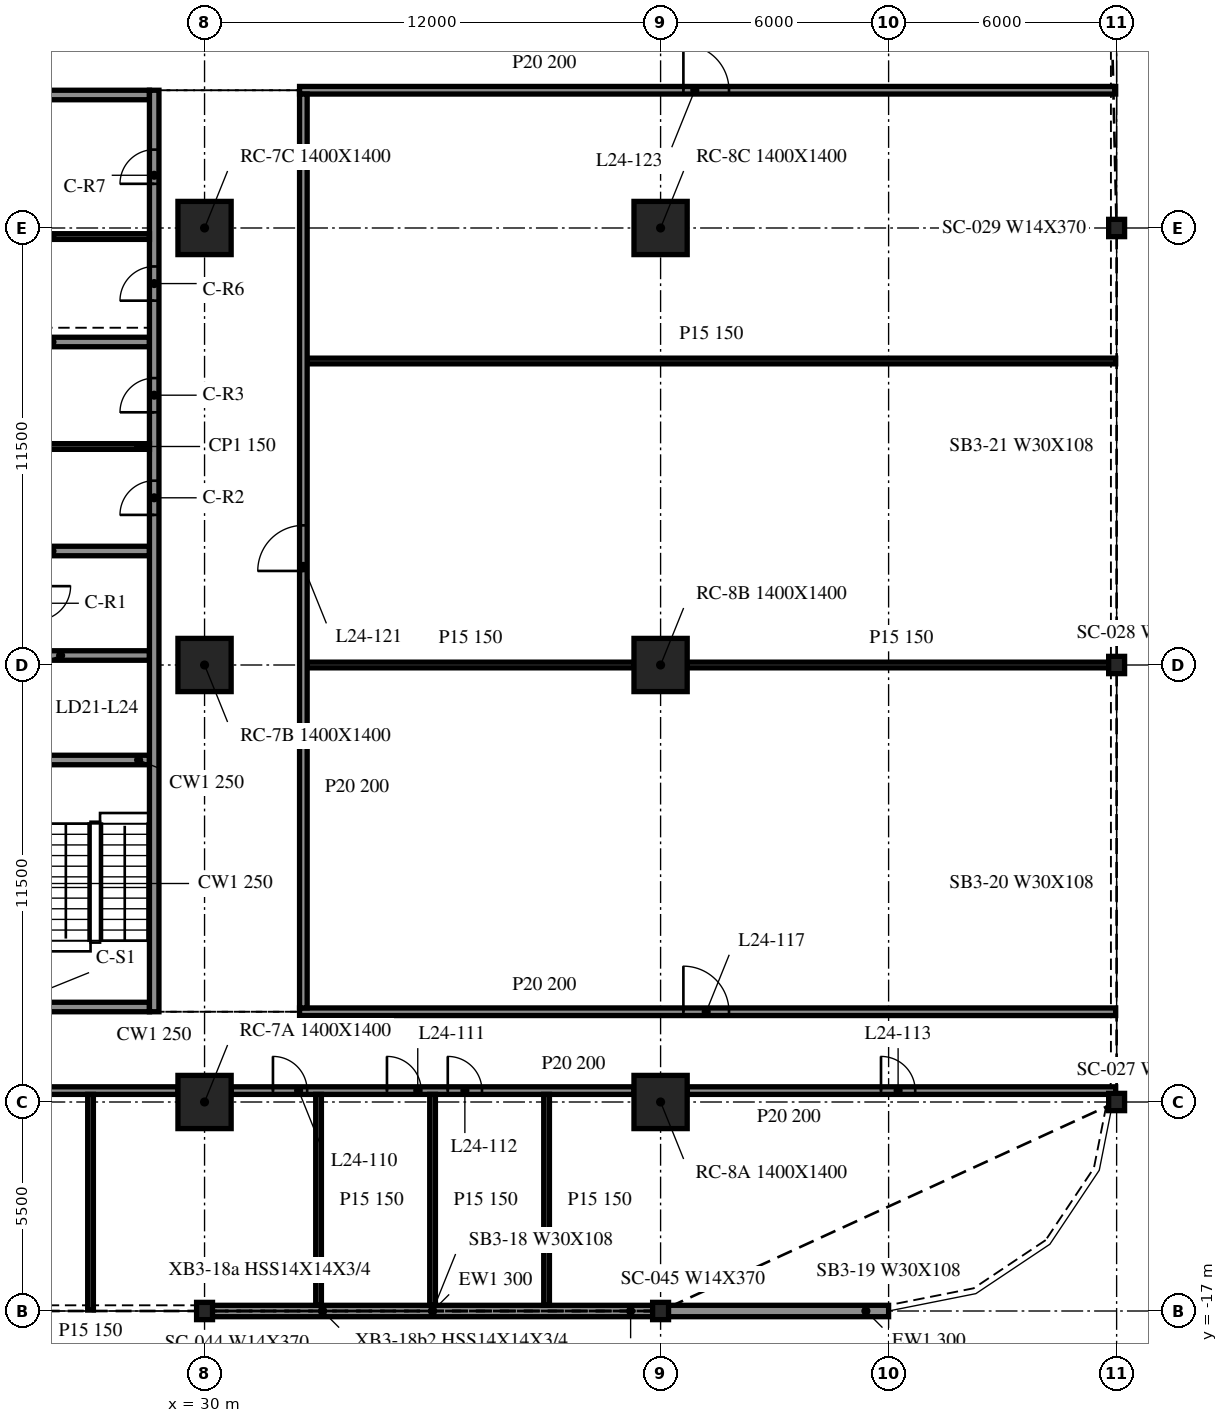
"""IFC4 building model, lengths in metres.
Left out: names, types, materials, properties, quantities, classifications, styles, units other than length and angle.
Written with IfcOpenShell. Run it as: python <this file> out.ifc"""

import sys

from ifc_helpers import new_model, si_unit, direction, frame, frame_2d, origin, origin_2d, place, context, subcontext, project, spatial, rectangle, i_section, extrude, element, fill, save


model = new_model("IFC4")
c1 = context("Model", 3, precision=1e-05, world=origin(), true_north=direction((0.0, 1.0)))
c2 = subcontext(c1, "Body", "Model", "MODEL_VIEW")
j1 = project(units=[si_unit("LENGTHUNIT", "METRE"), si_unit("PLANEANGLEUNIT", "RADIAN")], contexts=[c1])
p1 = place(None, origin())
s1 = spatial("IfcSite", under=j1, at=p1, CompositionType="ELEMENT")
p2 = place(p1, origin())
s2 = spatial("IfcBuilding", under=s1, at=p2, CompositionType="ELEMENT")
p3 = place(p2, frame((0.0, 0.0, 105.3)))
s3 = spatial("IfcBuildingStorey", under=s2, at=p3, CompositionType="ELEMENT", Elevation=105.3)
for number, where, z_axis, x_axis in (
    (1, (30.0, -11.5, -0.34), (0.0, 0.0, 1.0), (1.0, 0.0, 0.0)),
    (2, (30.0, 0.0, -0.34), (0.0, 0.0, 1.0), (1.0, 0.0, 0.0)),
    (3, (30.0, 11.5, -0.34), (0.0, 0.0, 1.0), (1.0, 0.0, 0.0)),
    (4, (42.0, -11.5, -0.34), (0.0, 0.0, 1.0), (1.0, 0.0, 0.0)),
    (5, (42.0, 0.0, -0.34), (0.0, 0.0, 1.0), (1.0, 0.0, 0.0)),
    (6, (42.0, 11.5, -0.34), (0.0, 0.0, 1.0), (1.0, 0.0, 0.0)),
):
    element("IfcColumn", number, at=place(p3, frame(where, z_axis=z_axis, x_axis=x_axis)), inside=s3, PredefinedType="COLUMN", context=c2, shape_type="SweptSolid", body=[
        extrude(rectangle(XDim=1.4, YDim=1.4, at=origin_2d()), origin(), (0.0, 0.0, 1.0), 4.1),
    ])
for number, where, z_axis, x_axis in (
    (7, (30.0, -17.0, -0.34), (0.0, 0.0, 1.0), (1.0, 0.0, 0.0)),
    (8, (42.0, -17.0, -0.34), (0.0, 0.0, 1.0), (1.0, 0.0, 0.0)),
    (9, (54.0, -11.5, -0.34), (0.0, 0.0, 1.0), (1.0, 0.0, 0.0)),
    (10, (54.0, 0.0, -0.34), (0.0, 0.0, 1.0), (1.0, 0.0, 0.0)),
    (11, (54.0, 11.5, -0.34), (0.0, 0.0, 1.0), (1.0, 0.0, 0.0)),
):
    element("IfcColumn", number, at=place(p3, frame(where, z_axis=z_axis, x_axis=x_axis)), inside=s3, PredefinedType="COLUMN", context=c2, shape_type="SweptSolid", body=[
        extrude(i_section(OverallWidth=0.419, OverallDepth=0.455, WebThickness=0.042, FlangeThickness=0.068, at=origin_2d()), origin(), (0.0, 0.0, 1.0), 4.1),
    ])
p4 = place(p3, frame((30.021, -17.0, 0.0), z_axis=(0.0, 0.0, 1.0), x_axis=(1.0, 0.0, 0.0)))
e12 = element("IfcWall", 12, at=p4, inside=s3, PredefinedType="NOTDEFINED", context=c2, shape_type="SweptSolid", body=[
    extrude(rectangle(XDim=11.958, YDim=0.3, at=frame_2d((5.979, 0.0))), origin(), (0.0, 0.0, 1.0), 3.003),
])
p5 = place(p3, frame((42.021, -17.0, 0.0), z_axis=(0.0, 0.0, 1.0), x_axis=(1.0, 0.0, 0.0)))
e13 = element("IfcWall", 13, at=p5, inside=s3, PredefinedType="NOTDEFINED", context=c2, shape_type="SweptSolid", body=[
    extrude(rectangle(XDim=5.979, YDim=0.3, at=frame_2d((2.99, 0.0))), origin(), (0.0, 0.0, 1.0), 3.003),
])
p6 = place(p3, frame((28.675, -9.125, 0.0), z_axis=(0.0, 0.0, 1.0), x_axis=(0.0, 1.0, 0.0)))
e14 = element("IfcWall", 14, at=p6, inside=s3, PredefinedType="SOLIDWALL", context=c2, shape_type="SweptSolid", body=[
    extrude(rectangle(XDim=24.25, YDim=0.25, at=frame_2d((12.125, 0.0))), origin(), (0.0, 0.0, 1.0), 3.76),
])
p7 = place(p6, frame((13.075, 0.0, 0.0)))
e15 = element("IfcOpeningElement", 15, at=p7, cuts=e14, PredefinedType="OPENING", context=c2, shape_type="SweptSolid", body=[
    extrude(rectangle(XDim=0.9, YDim=2.1, at=frame_2d((0.45, 1.05))), frame((0.0, 0.135, 0.0), z_axis=(0.0, -1.0, 0.0), x_axis=(1.0, 0.0, 0.0)), (0.0, 0.0, 1.0), 0.27),
])
p8 = place(p6, frame((15.775, 0.0, 0.0)))
e16 = element("IfcOpeningElement", 16, at=p8, cuts=e14, PredefinedType="OPENING", context=c2, shape_type="SweptSolid", body=[
    extrude(rectangle(XDim=0.9, YDim=2.1, at=frame_2d((0.45, 1.05))), frame((0.0, 0.135, 0.0), z_axis=(0.0, -1.0, 0.0), x_axis=(1.0, 0.0, 0.0)), (0.0, 0.0, 1.0), 0.27),
])
p9 = place(p6, frame((18.712, 0.0, 0.0)))
e17 = element("IfcOpeningElement", 17, at=p9, cuts=e14, PredefinedType="OPENING", context=c2, shape_type="SweptSolid", body=[
    extrude(rectangle(XDim=0.9, YDim=2.1, at=frame_2d((0.45, 1.05))), frame((0.0, 0.135, 0.0), z_axis=(0.0, -1.0, 0.0), x_axis=(1.0, 0.0, 0.0)), (0.0, 0.0, 1.0), 0.27),
])
p10 = place(p6, frame((21.788, 0.0, 0.0)))
e18 = element("IfcOpeningElement", 18, at=p10, cuts=e14, PredefinedType="OPENING", context=c2, shape_type="SweptSolid", body=[
    extrude(rectangle(XDim=0.9, YDim=2.1, at=frame_2d((0.45, 1.05))), frame((0.0, 0.135, 0.0), z_axis=(0.0, -1.0, 0.0), x_axis=(1.0, 0.0, 0.0)), (0.0, 0.0, 1.0), 0.27),
])
p11 = place(p3, frame((28.55, -9.0, 0.0), z_axis=(0.0, 0.0, 1.0), x_axis=(-1.0, 0.0, 0.0)))
e19 = element("IfcWall", 19, at=p11, inside=s3, PredefinedType="SOLIDWALL", context=c2, shape_type="SweptSolid", body=[
    extrude(rectangle(XDim=9.1, YDim=0.25, at=frame_2d((4.55, 0.0))), origin(), (0.0, 0.0, 1.0), 3.76),
])
p12 = place(p11, frame((3.65, 0.0, 0.0)))
e20 = element("IfcOpeningElement", 20, at=p12, cuts=e19, PredefinedType="OPENING", context=c2, shape_type="SweptSolid", body=[
    extrude(rectangle(XDim=1.8, YDim=2.1, at=frame_2d((0.9, 1.05))), frame((0.0, 0.135, 0.0), z_axis=(0.0, -1.0, 0.0), x_axis=(1.0, 0.0, 0.0)), (0.0, 0.0, 1.0), 0.27),
])
p13 = place(p3, frame((19.45, 15.0, 0.0), z_axis=(0.0, 0.0, 1.0), x_axis=(1.0, 0.0, 0.0)))
e21 = element("IfcWall", 21, at=p13, inside=s3, PredefinedType="SOLIDWALL", context=c2, shape_type="SweptSolid", body=[
    extrude(rectangle(XDim=9.1, YDim=0.25, at=frame_2d((4.55, 0.0))), origin(), (0.0, 0.0, 1.0), 3.76),
])
p14 = place(p13, frame((3.65, 0.0, 0.0)))
e22 = element("IfcOpeningElement", 22, at=p14, cuts=e21, PredefinedType="OPENING", context=c2, shape_type="SweptSolid", body=[
    extrude(rectangle(XDim=1.8, YDim=2.1, at=frame_2d((0.9, 1.05))), frame((0.0, 0.135, 0.0), z_axis=(0.0, -1.0, 0.0), x_axis=(1.0, 0.0, 0.0)), (0.0, 0.0, 1.0), 0.27),
])
for number, where, z_axis, x_axis in (
    (23, (25.7, -2.5, 0.0), (0.0, 0.0, 1.0), (1.0, 0.0, 0.0)),
    (24, (25.7, 0.25, 0.0), (0.0, 0.0, 1.0), (1.0, 0.0, 0.0)),
    (25, (25.7, 3.0, 0.0), (0.0, 0.0, 1.0), (1.0, 0.0, 0.0)),
    (26, (25.7, 8.5, 0.0), (0.0, 0.0, 1.0), (1.0, 0.0, 0.0)),
):
    element("IfcWall", number, at=place(p3, frame(where, z_axis=z_axis, x_axis=x_axis)), inside=s3, PredefinedType="SOLIDWALL", context=c2, shape_type="SweptSolid", body=[
        extrude(rectangle(XDim=2.85, YDim=0.25, at=frame_2d((1.425, 0.0))), origin(), (0.0, 0.0, 1.0), 3.76),
    ])
for number, where, z_axis, x_axis in (
    (27, (25.7, 5.75, 0.0), (0.0, 0.0, 1.0), (1.0, 0.0, 0.0)),
    (28, (25.7, 11.275, 0.0), (0.0, 0.0, 1.0), (1.0, 0.0, 0.0)),
):
    element("IfcWall", number, at=place(p3, frame(where, z_axis=z_axis, x_axis=x_axis)), inside=s3, PredefinedType="PARTITIONING", context=c2, shape_type="SweptSolid", body=[
        extrude(rectangle(XDim=2.85, YDim=0.15, at=frame_2d((1.425, 0.0))), origin(), (0.0, 0.0, 1.0), 3.76),
    ])
p15 = place(p3, frame((18.7, -11.2, 0.0), z_axis=(0.0, 0.0, 1.0), x_axis=(1.0, 0.0, 0.0)))
e29 = element("IfcWall", 29, at=p15, inside=s3, PredefinedType="PARTITIONING", context=c2, shape_type="SweptSolid", body=[
    extrude(rectangle(XDim=10.6, YDim=0.2, at=frame_2d((5.3, 0.0))), origin(), (0.0, 0.0, 1.0), 3.76),
])
p16 = place(p15, frame((4.9, 0.0, 0.0)))
e30 = element("IfcOpeningElement", 30, at=p16, cuts=e29, PredefinedType="OPENING", context=c2, shape_type="SweptSolid", body=[
    extrude(rectangle(XDim=0.9, YDim=2.1, at=frame_2d((0.45, 1.05))), frame((0.0, 0.11, 0.0), z_axis=(0.0, -1.0, 0.0), x_axis=(1.0, 0.0, 0.0)), (0.0, 0.0, 1.0), 0.22),
])
p17 = place(p3, frame((30.7, -11.2, 0.0), z_axis=(0.0, 0.0, 1.0), x_axis=(1.0, 0.0, 0.0)))
e31 = element("IfcWall", 31, at=p17, inside=s3, PredefinedType="PARTITIONING", context=c2, shape_type="SweptSolid", body=[
    extrude(rectangle(XDim=10.6, YDim=0.2, at=frame_2d((5.3, 0.0))), origin(), (0.0, 0.0, 1.0), 3.76),
])
p18 = place(p17, frame((1.1, 0.0, 0.0)))
e32 = element("IfcOpeningElement", 32, at=p18, cuts=e31, PredefinedType="OPENING", context=c2, shape_type="SweptSolid", body=[
    extrude(rectangle(XDim=0.9, YDim=2.1, at=frame_2d((0.45, 1.05))), frame((0.0, 0.11, 0.0), z_axis=(0.0, -1.0, 0.0), x_axis=(1.0, 0.0, 0.0)), (0.0, 0.0, 1.0), 0.22),
])
p19 = place(p17, frame((4.1, 0.0, 0.0)))
e33 = element("IfcOpeningElement", 33, at=p19, cuts=e31, PredefinedType="OPENING", context=c2, shape_type="SweptSolid", body=[
    extrude(rectangle(XDim=0.9, YDim=2.1, at=frame_2d((0.45, 1.05))), frame((0.0, 0.11, 0.0), z_axis=(0.0, -1.0, 0.0), x_axis=(1.0, 0.0, 0.0)), (0.0, 0.0, 1.0), 0.22),
])
p20 = place(p17, frame((5.7, 0.0, 0.0)))
e34 = element("IfcOpeningElement", 34, at=p20, cuts=e31, PredefinedType="OPENING", context=c2, shape_type="SweptSolid", body=[
    extrude(rectangle(XDim=0.9, YDim=2.1, at=frame_2d((0.45, 1.05))), frame((0.0, 0.11, 0.0), z_axis=(0.0, -1.0, 0.0), x_axis=(1.0, 0.0, 0.0)), (0.0, 0.0, 1.0), 0.22),
])
p21 = place(p3, frame((42.7, -11.2, 0.0), z_axis=(0.0, 0.0, 1.0), x_axis=(1.0, 0.0, 0.0)))
e35 = element("IfcWall", 35, at=p21, inside=s3, PredefinedType="PARTITIONING", context=c2, shape_type="SweptSolid", body=[
    extrude(rectangle(XDim=11.275, YDim=0.2, at=frame_2d((5.638, 0.0))), origin(), (0.0, 0.0, 1.0), 3.76),
])
p22 = place(p21, frame((5.1, 0.0, 0.0)))
e36 = element("IfcOpeningElement", 36, at=p22, cuts=e35, PredefinedType="OPENING", context=c2, shape_type="SweptSolid", body=[
    extrude(rectangle(XDim=0.9, YDim=2.1, at=frame_2d((0.45, 1.05))), frame((0.0, 0.11, 0.0), z_axis=(0.0, -1.0, 0.0), x_axis=(1.0, 0.0, 0.0)), (0.0, 0.0, 1.0), 0.22),
])
p23 = place(p3, frame((32.5, -9.125, 0.0), z_axis=(0.0, 0.0, 1.0), x_axis=(1.0, 0.0, 0.0)))
e37 = element("IfcWall", 37, at=p23, inside=s3, PredefinedType="PARTITIONING", context=c2, shape_type="SweptSolid", body=[
    extrude(rectangle(XDim=21.475, YDim=0.2, at=frame_2d((10.738, 0.0))), origin(), (0.0, 0.0, 1.0), 3.76),
])
p24 = place(p23, frame((10.1, 0.0, 0.0)))
e38 = element("IfcOpeningElement", 38, at=p24, cuts=e37, PredefinedType="OPENING", context=c2, shape_type="SweptSolid", body=[
    extrude(rectangle(XDim=1.2, YDim=2.1, at=frame_2d((0.6, 1.05))), frame((0.0, 0.11, 0.0), z_axis=(0.0, -1.0, 0.0), x_axis=(1.0, 0.0, 0.0)), (0.0, 0.0, 1.0), 0.22),
])
p25 = place(p3, frame((32.7, 0.0, 0.0), z_axis=(0.0, 0.0, 1.0), x_axis=(1.0, 0.0, 0.0)))
e39 = element("IfcWall", 39, at=p25, inside=s3, PredefinedType="PARTITIONING", context=c2, shape_type="SweptSolid", body=[
    extrude(rectangle(XDim=8.6, YDim=0.15, at=frame_2d((4.3, 0.0))), origin(), (0.0, 0.0, 1.0), 3.76),
])
p26 = place(p3, frame((42.7, 0.0, 0.0), z_axis=(0.0, 0.0, 1.0), x_axis=(1.0, 0.0, 0.0)))
e40 = element("IfcWall", 40, at=p26, inside=s3, PredefinedType="PARTITIONING", context=c2, shape_type="SweptSolid", body=[
    extrude(rectangle(XDim=11.275, YDim=0.15, at=frame_2d((5.638, 0.0))), origin(), (0.0, 0.0, 1.0), 3.76),
])
p27 = place(p3, frame((32.7, 8.0, 0.0), z_axis=(0.0, 0.0, 1.0), x_axis=(1.0, 0.0, 0.0)))
e41 = element("IfcWall", 41, at=p27, inside=s3, PredefinedType="PARTITIONING", context=c2, shape_type="SweptSolid", body=[
    extrude(rectangle(XDim=21.275, YDim=0.15, at=frame_2d((10.638, 0.0))), origin(), (0.0, 0.0, 1.0), 3.76),
])
p28 = place(p3, frame((32.5, 15.125, 0.0), z_axis=(0.0, 0.0, 1.0), x_axis=(1.0, 0.0, 0.0)))
e42 = element("IfcWall", 42, at=p28, inside=s3, PredefinedType="PARTITIONING", context=c2, shape_type="SweptSolid", body=[
    extrude(rectangle(XDim=21.475, YDim=0.2, at=frame_2d((10.738, 0.0))), origin(), (0.0, 0.0, 1.0), 3.76),
])
p29 = place(p28, frame((10.1, 0.0, 0.0)))
e43 = element("IfcOpeningElement", 43, at=p29, cuts=e42, PredefinedType="OPENING", context=c2, shape_type="SweptSolid", body=[
    extrude(rectangle(XDim=1.2, YDim=2.1, at=frame_2d((0.6, 1.05))), frame((0.0, 0.11, 0.0), z_axis=(0.0, -1.0, 0.0), x_axis=(1.0, 0.0, 0.0)), (0.0, 0.0, 1.0), 0.22),
])
p30 = place(p3, frame((27.0, -16.975, 0.0), z_axis=(0.0, 0.0, 1.0), x_axis=(0.0, 1.0, 0.0)))
e44 = element("IfcWall", 44, at=p30, inside=s3, PredefinedType="PARTITIONING", context=c2, shape_type="SweptSolid", body=[
    extrude(rectangle(XDim=5.675, YDim=0.15, at=frame_2d((2.837, 0.0))), origin(), (0.0, 0.0, 1.0), 3.76),
])
p31 = place(p3, frame((32.6, -9.025, 0.0), z_axis=(0.0, 0.0, 1.0), x_axis=(0.0, 1.0, 0.0)))
e45 = element("IfcWall", 45, at=p31, inside=s3, PredefinedType="PARTITIONING", context=c2, shape_type="SweptSolid", body=[
    extrude(rectangle(XDim=24.05, YDim=0.2, at=frame_2d((12.025, 0.0))), origin(), (0.0, 0.0, 1.0), 3.76),
])
p32 = place(p31, frame((11.5, 0.0, 0.0)))
e46 = element("IfcOpeningElement", 46, at=p32, cuts=e45, PredefinedType="OPENING", context=c2, shape_type="SweptSolid", body=[
    extrude(rectangle(XDim=1.2, YDim=2.1, at=frame_2d((0.6, 1.05))), frame((0.0, 0.11, 0.0), z_axis=(0.0, -1.0, 0.0), x_axis=(1.0, 0.0, 0.0)), (0.0, 0.0, 1.0), 0.22),
])
for number, where, z_axis, x_axis in (
    (47, (33.0, -16.85, 0.0), (0.0, 0.0, 1.0), (0.0, 1.0, 0.0)),
    (48, (36.0, -16.85, 0.0), (0.0, 0.0, 1.0), (0.0, 1.0, 0.0)),
    (49, (39.0, -16.85, 0.0), (0.0, 0.0, 1.0), (0.0, 1.0, 0.0)),
):
    element("IfcWall", number, at=place(p3, frame(where, z_axis=z_axis, x_axis=x_axis)), inside=s3, PredefinedType="PARTITIONING", context=c2, shape_type="SweptSolid", body=[
        extrude(rectangle(XDim=5.55, YDim=0.15, at=frame_2d((2.775, 0.0))), origin(), (0.0, 0.0, 1.0), 3.76),
    ])
p33 = place(p7, origin())
e50 = element("IfcDoor", 50, at=p33, inside=s3, OperationType="SINGLE_SWING_RIGHT", PredefinedType="DOOR", context=c2, shape_type="SweptSolid", body=[
    extrude(rectangle(XDim=0.9, YDim=2.1, at=frame_2d((0.45, 1.05))), frame((0.0, 0.025, 0.0), z_axis=(0.0, -1.0, 0.0), x_axis=(1.0, 0.0, 0.0)), (0.0, 0.0, 1.0), 0.05),
])
fill(e15, e50)
p34 = place(p8, origin())
e51 = element("IfcDoor", 51, at=p34, inside=s3, OperationType="SINGLE_SWING_LEFT", PredefinedType="DOOR", context=c2, shape_type="SweptSolid", body=[
    extrude(rectangle(XDim=0.9, YDim=2.1, at=frame_2d((0.45, 1.05))), frame((0.0, 0.025, 0.0), z_axis=(0.0, -1.0, 0.0), x_axis=(1.0, 0.0, 0.0)), (0.0, 0.0, 1.0), 0.05),
])
fill(e16, e51)
p35 = place(p9, origin())
e52 = element("IfcDoor", 52, at=p35, inside=s3, OperationType="SINGLE_SWING_RIGHT", PredefinedType="DOOR", context=c2, shape_type="SweptSolid", body=[
    extrude(rectangle(XDim=0.9, YDim=2.1, at=frame_2d((0.45, 1.05))), frame((0.0, 0.025, 0.0), z_axis=(0.0, -1.0, 0.0), x_axis=(1.0, 0.0, 0.0)), (0.0, 0.0, 1.0), 0.05),
])
fill(e17, e52)
p36 = place(p10, origin())
e53 = element("IfcDoor", 53, at=p36, inside=s3, OperationType="SINGLE_SWING_LEFT", PredefinedType="DOOR", context=c2, shape_type="SweptSolid", body=[
    extrude(rectangle(XDim=0.9, YDim=2.1, at=frame_2d((0.45, 1.05))), frame((0.0, 0.025, 0.0), z_axis=(0.0, -1.0, 0.0), x_axis=(1.0, 0.0, 0.0)), (0.0, 0.0, 1.0), 0.05),
])
fill(e18, e53)
p37 = place(p18, origin())
e54 = element("IfcDoor", 54, at=p37, inside=s3, OperationType="SINGLE_SWING_RIGHT", PredefinedType="DOOR", context=c2, shape_type="SweptSolid", body=[
    extrude(rectangle(XDim=0.9, YDim=2.1, at=frame_2d((0.45, 1.05))), frame((0.0, 0.025, 0.0), z_axis=(0.0, -1.0, 0.0), x_axis=(1.0, 0.0, 0.0)), (0.0, 0.0, 1.0), 0.05),
])
fill(e32, e54)
p38 = place(p19, origin())
e55 = element("IfcDoor", 55, at=p38, inside=s3, OperationType="SINGLE_SWING_RIGHT", PredefinedType="DOOR", context=c2, shape_type="SweptSolid", body=[
    extrude(rectangle(XDim=0.9, YDim=2.1, at=frame_2d((0.45, 1.05))), frame((0.0, 0.025, 0.0), z_axis=(0.0, -1.0, 0.0), x_axis=(1.0, 0.0, 0.0)), (0.0, 0.0, 1.0), 0.05),
])
fill(e33, e55)
p39 = place(p20, origin())
e56 = element("IfcDoor", 56, at=p39, inside=s3, OperationType="SINGLE_SWING_LEFT", PredefinedType="DOOR", context=c2, shape_type="SweptSolid", body=[
    extrude(rectangle(XDim=0.9, YDim=2.1, at=frame_2d((0.45, 1.05))), frame((0.0, 0.025, 0.0), z_axis=(0.0, -1.0, 0.0), x_axis=(1.0, 0.0, 0.0)), (0.0, 0.0, 1.0), 0.05),
])
fill(e34, e56)
p40 = place(p22, origin())
e57 = element("IfcDoor", 57, at=p40, inside=s3, OperationType="SINGLE_SWING_RIGHT", PredefinedType="DOOR", context=c2, shape_type="SweptSolid", body=[
    extrude(rectangle(XDim=0.9, YDim=2.1, at=frame_2d((0.45, 1.05))), frame((0.0, 0.025, 0.0), z_axis=(0.0, -1.0, 0.0), x_axis=(1.0, 0.0, 0.0)), (0.0, 0.0, 1.0), 0.05),
])
fill(e36, e57)
p41 = place(p24, origin())
e58 = element("IfcDoor", 58, at=p41, inside=s3, OperationType="SINGLE_SWING_RIGHT", PredefinedType="DOOR", context=c2, shape_type="SweptSolid", body=[
    extrude(rectangle(XDim=1.2, YDim=2.1, at=frame_2d((0.6, 1.05))), frame((0.0, 0.025, 0.0), z_axis=(0.0, -1.0, 0.0), x_axis=(1.0, 0.0, 0.0)), (0.0, 0.0, 1.0), 0.05),
])
fill(e38, e58)
p42 = place(p32, origin())
e59 = element("IfcDoor", 59, at=p42, inside=s3, OperationType="SINGLE_SWING_LEFT", PredefinedType="DOOR", context=c2, shape_type="SweptSolid", body=[
    extrude(rectangle(XDim=1.2, YDim=2.1, at=frame_2d((0.6, 1.05))), frame((0.0, 0.025, 0.0), z_axis=(0.0, -1.0, 0.0), x_axis=(1.0, 0.0, 0.0)), (0.0, 0.0, 1.0), 0.05),
])
fill(e46, e59)
p43 = place(p29, origin())
e60 = element("IfcDoor", 60, at=p43, inside=s3, OperationType="SINGLE_SWING_LEFT", PredefinedType="DOOR", context=c2, shape_type="SweptSolid", body=[
    extrude(rectangle(XDim=1.2, YDim=2.1, at=frame_2d((0.6, 1.05))), frame((0.0, 0.025, 0.0), z_axis=(0.0, -1.0, 0.0), x_axis=(1.0, 0.0, 0.0)), (0.0, 0.0, 1.0), 0.05),
])
fill(e43, e60)
save(model, sys.argv[1])
